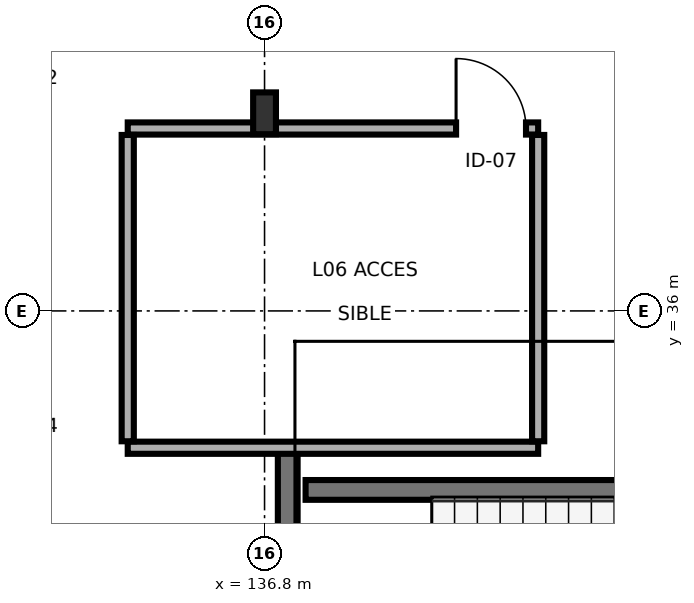
"""IFC4 building model, lengths in metres.
Left out: names, types, materials, properties, quantities, classifications, styles, units other than length and angle.
Written with IfcOpenShell. Run it as: python <this file> out.ifc"""

import sys

from ifc_helpers import new_model, si_unit, direction, frame, frame_2d, origin, origin_2d, place, context, subcontext, project, spatial, rectangle, i_section, extrude, element, fill, save


model = new_model("IFC4")
c1 = context("Model", 3, precision=1e-05, world=origin(), true_north=direction((0.0, 1.0)))
c2 = subcontext(c1, "Body", "Model", "MODEL_VIEW")
j1 = project(units=[si_unit("LENGTHUNIT", "METRE"), si_unit("PLANEANGLEUNIT", "RADIAN")], contexts=[c1])
p1 = place(None, origin())
s1 = spatial("IfcSite", under=j1, at=p1, CompositionType="ELEMENT")
p2 = place(p1, origin())
s2 = spatial("IfcBuilding", under=s1, at=p2, CompositionType="ELEMENT")
p3 = place(p2, frame((0.0, 0.0, 21.5)))
s3 = spatial("IfcBuildingStorey", under=s2, at=p3, CompositionType="ELEMENT", Elevation=21.5)
p4 = place(p3, frame((136.8, 38.6, 0.0), z_axis=(0.0, 0.0, 1.0), x_axis=(1.0, 0.0, 0.0)))
e1 = element("IfcColumn", 1, at=p4, inside=s3, PredefinedType="COLUMN", context=c2, shape_type="SweptSolid", body=[
    extrude(i_section(OverallWidth=0.3, OverallDepth=0.55, WebThickness=0.015, FlangeThickness=0.029, FilletRadius=0.027, at=origin_2d()), origin(), (0.0, 0.0, 1.0), 3.4),
])
p5 = place(p3, frame((137.105, 29.54, 0.0), z_axis=(0.0, 0.0, 1.0), x_axis=(0.0, 1.0, 0.0)))
e2 = element("IfcWall", 2, at=p5, inside=s3, PredefinedType="SHEAR", context=c2, shape_type="SweptSolid", body=[
    extrude(rectangle(XDim=4.635, YDim=0.26, at=frame_2d((2.317, 0.0))), origin(), (0.0, 0.0, 1.0), 3.195),
])
p6 = place(p5, frame((0.61, 0.0, 0.0)))
e3 = element("IfcOpeningElement", 3, at=p6, cuts=e2, PredefinedType="OPENING", context=c2, shape_type="SweptSolid", body=[
    extrude(rectangle(XDim=1.1, YDim=2.2, at=frame_2d((0.55, 1.1))), frame((0.0, 0.14, 0.0), z_axis=(0.0, -1.0, 0.0), x_axis=(1.0, 0.0, 0.0)), (0.0, 0.0, 1.0), 0.28),
])
p7 = place(p3, frame((137.34, 33.645, 0.0), z_axis=(0.0, 0.0, 1.0), x_axis=(1.0, 0.0, 0.0)))
e4 = element("IfcWall", 4, at=p7, inside=s3, PredefinedType="SHEAR", context=c2, shape_type="SweptSolid", body=[
    extrude(rectangle(XDim=8.52, YDim=0.26, at=frame_2d((4.26, 0.0))), origin(), (0.0, 0.0, 1.0), 3.195),
])
p8 = place(p3, frame((135.0, 34.2, 0.0), z_axis=(0.0, 0.0, 1.0), x_axis=(1.0, 0.0, 0.0)))
e5 = element("IfcWall", 5, at=p8, inside=s3, PredefinedType="PARTITIONING", context=c2, shape_type="SweptSolid", body=[
    extrude(rectangle(XDim=5.4, YDim=0.16, at=frame_2d((2.7, 0.0))), origin(), (0.0, 0.0, 1.0), 2.73),
])
p9 = place(p3, frame((135.0, 38.4, 0.0), z_axis=(0.0, 0.0, 1.0), x_axis=(1.0, 0.0, 0.0)))
e6 = element("IfcWall", 6, at=p9, inside=s3, PredefinedType="PARTITIONING", context=c2, shape_type="SweptSolid", body=[
    extrude(rectangle(XDim=5.4, YDim=0.16, at=frame_2d((2.7, 0.0))), origin(), (0.0, 0.0, 1.0), 2.73),
])
p10 = place(p9, frame((4.32, 0.0, 0.0)))
e7 = element("IfcOpeningElement", 7, at=p10, cuts=e6, PredefinedType="OPENING", context=c2, shape_type="SweptSolid", body=[
    extrude(rectangle(XDim=0.92, YDim=2.1, at=frame_2d((0.46, 1.05))), frame((0.0, 0.09, 0.0), z_axis=(0.0, -1.0, 0.0), x_axis=(1.0, 0.0, 0.0)), (0.0, 0.0, 1.0), 0.18),
])
p11 = place(p3, frame((135.0, 34.285, 0.0), z_axis=(0.0, 0.0, 1.0), x_axis=(0.0, 1.0, 0.0)))
e8 = element("IfcWall", 8, at=p11, inside=s3, PredefinedType="PARTITIONING", context=c2, shape_type="SweptSolid", body=[
    extrude(rectangle(XDim=4.03, YDim=0.16, at=frame_2d((2.015, 0.0))), origin(), (0.0, 0.0, 1.0), 2.73),
])
p12 = place(p3, frame((140.4, 34.285, 0.0), z_axis=(0.0, 0.0, 1.0), x_axis=(0.0, 1.0, 0.0)))
e9 = element("IfcWall", 9, at=p12, inside=s3, PredefinedType="PARTITIONING", context=c2, shape_type="SweptSolid", body=[
    extrude(rectangle(XDim=4.03, YDim=0.16, at=frame_2d((2.015, 0.0))), origin(), (0.0, 0.0, 1.0), 3.195),
])
p13 = place(p10, origin())
e10 = element("IfcDoor", 10, at=p13, inside=s3, OperationType="SINGLE_SWING_LEFT", PredefinedType="DOOR", context=c2, shape_type="SweptSolid", body=[
    extrude(rectangle(XDim=0.92, YDim=2.1, at=frame_2d((0.46, 1.05))), frame((0.0, 0.025, 0.0), z_axis=(0.0, -1.0, 0.0), x_axis=(1.0, 0.0, 0.0)), (0.0, 0.0, 1.0), 0.05),
])
fill(e7, e10)
save(model, sys.argv[1])
